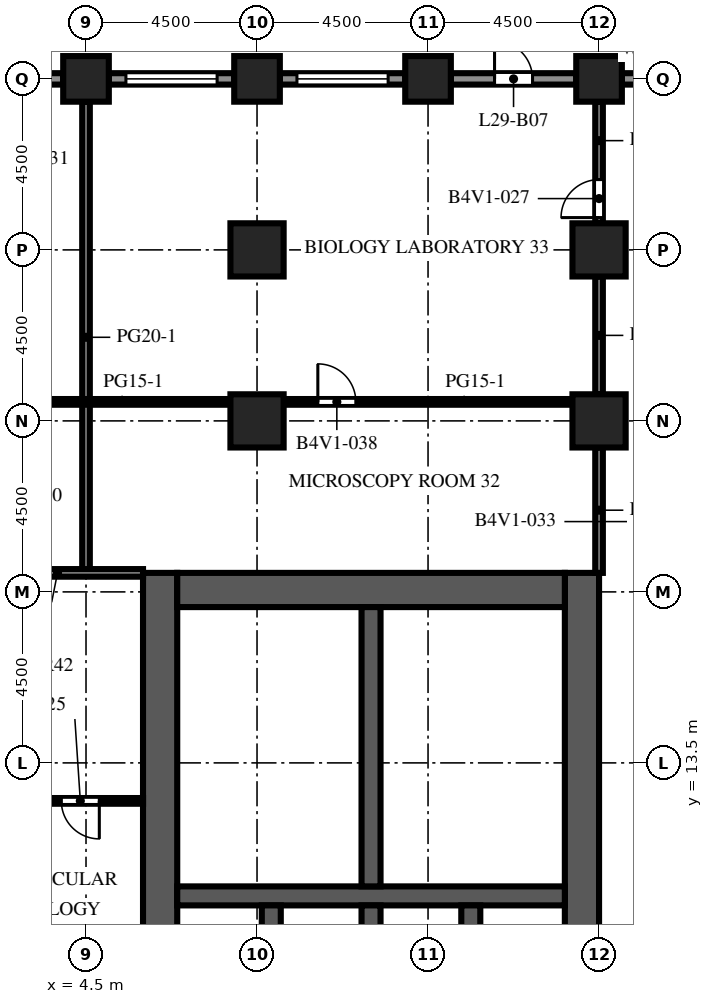
"""IFC4 building model, lengths in metres.
Left out: names, types, materials, properties, quantities, classifications, styles, units other than length and angle.
Written with IfcOpenShell. Run it as: python <this file> out.ifc"""

import sys

from ifc_helpers import new_model, si_unit, direction, frame, frame_2d, origin, origin_2d, place, context, subcontext, project, spatial, rectangle, extrude, element, fill, save


model = new_model("IFC4")
c1 = context("Model", 3, precision=1e-05, world=origin(), true_north=direction((0.0, 1.0)))
c2 = subcontext(c1, "Body", "Model", "MODEL_VIEW")
j1 = project(units=[si_unit("LENGTHUNIT", "METRE"), si_unit("PLANEANGLEUNIT", "RADIAN")], contexts=[c1])
p1 = place(None, origin())
s1 = spatial("IfcSite", under=j1, at=p1, CompositionType="ELEMENT")
p2 = place(p1, origin())
s2 = spatial("IfcBuilding", under=s1, at=p2, CompositionType="ELEMENT")
p3 = place(p2, frame((0.0, 0.0, 129.0)))
s3 = spatial("IfcBuildingStorey", under=s2, at=p3, CompositionType="ELEMENT", Elevation=129.0)
for number, where, z_axis, x_axis in (
    (1, (4.5, 31.5, 0.0), (0.0, 0.0, 1.0), (1.0, 0.0, 0.0)),
    (2, (9.0, 31.5, 0.0), (0.0, 0.0, 1.0), (1.0, 0.0, 0.0)),
    (3, (13.5, 31.5, 0.0), (0.0, 0.0, 1.0), (1.0, 0.0, 0.0)),
    (4, (18.0, 31.5, 0.0), (0.0, 0.0, 1.0), (1.0, 0.0, 0.0)),
):
    element("IfcColumn", number, at=place(p3, frame(where, z_axis=z_axis, x_axis=x_axis)), inside=s3, PredefinedType="COLUMN", context=c2, shape_type="SweptSolid", body=[
        extrude(rectangle(XDim=1.2, YDim=1.2, at=origin_2d()), origin(), (0.0, 0.0, 1.0), 4.1),
    ])
for number, where, z_axis, x_axis in (
    (5, (9.0, 22.5, 0.0), (0.0, 0.0, 1.0), (1.0, 0.0, 0.0)),
    (6, (9.0, 27.0, 0.0), (0.0, 0.0, 1.0), (1.0, 0.0, 0.0)),
    (7, (18.0, 22.5, 0.0), (0.0, 0.0, 1.0), (1.0, 0.0, 0.0)),
    (8, (18.0, 27.0, 0.0), (0.0, 0.0, 1.0), (1.0, 0.0, 0.0)),
):
    element("IfcColumn", number, at=place(p3, frame(where, z_axis=z_axis, x_axis=x_axis)), inside=s3, PredefinedType="COLUMN", context=c2, shape_type="SweptSolid", body=[
        extrude(rectangle(XDim=1.4, YDim=1.4, at=origin_2d()), origin(), (0.0, 0.0, 1.0), 4.1),
    ])
p4 = place(p3, frame((6.45, -9.0, 0.0), z_axis=(0.0, 0.0, 1.0), x_axis=(0.0, 1.0, 0.0)))
e9 = element("IfcWall", 9, at=p4, inside=s3, PredefinedType="SHEAR", context=c2, shape_type="SweptSolid", body=[
    extrude(rectangle(XDim=27.5, YDim=0.9, at=frame_2d((13.75, 0.0))), origin(), (0.0, 0.0, 1.0), 4.1),
])
p5 = place(p4, frame((12.55, 0.0, 0.0)))
e10 = element("IfcOpeningElement", 10, at=p5, cuts=e9, PredefinedType="OPENING", context=c2, shape_type="SweptSolid", body=[
    extrude(rectangle(XDim=2.4, YDim=2.4, at=frame_2d((1.2, 1.2))), frame((0.0, 0.46, 0.0), z_axis=(0.0, -1.0, 0.0), x_axis=(1.0, 0.0, 0.0)), (0.0, 0.0, 1.0), 0.92),
])
p6 = place(p4, frame((3.975, 0.0, 0.0)))
e11 = element("IfcOpeningElement", 11, at=p6, cuts=e9, PredefinedType="OPENING", context=c2, shape_type="SweptSolid", body=[
    extrude(rectangle(XDim=1.2, YDim=2.1, at=frame_2d((0.6, 1.05))), frame((0.0, 0.46, 0.0), z_axis=(0.0, -1.0, 0.0), x_axis=(1.0, 0.0, 0.0)), (0.0, 0.0, 1.0), 0.92),
])
p7 = place(p4, frame((22.325, 0.0, 0.0)))
e12 = element("IfcOpeningElement", 12, at=p7, cuts=e9, PredefinedType="OPENING", context=c2, shape_type="SweptSolid", body=[
    extrude(rectangle(XDim=1.2, YDim=2.1, at=frame_2d((0.6, 1.05))), frame((0.0, 0.46, 0.0), z_axis=(0.0, -1.0, 0.0), x_axis=(1.0, 0.0, 0.0)), (0.0, 0.0, 1.0), 0.92),
])
p8 = place(p3, frame((17.55, -9.0, 0.0), z_axis=(0.0, 0.0, 1.0), x_axis=(0.0, 1.0, 0.0)))
e13 = element("IfcWall", 13, at=p8, inside=s3, PredefinedType="SHEAR", context=c2, shape_type="SweptSolid", body=[
    extrude(rectangle(XDim=27.5, YDim=0.9, at=frame_2d((13.75, 0.0))), origin(), (0.0, 0.0, 1.0), 4.1),
])
p9 = place(p8, frame((12.55, 0.0, 0.0)))
e14 = element("IfcOpeningElement", 14, at=p9, cuts=e13, PredefinedType="OPENING", context=c2, shape_type="SweptSolid", body=[
    extrude(rectangle(XDim=2.4, YDim=2.4, at=frame_2d((1.2, 1.2))), frame((0.0, 0.46, 0.0), z_axis=(0.0, -1.0, 0.0), x_axis=(1.0, 0.0, 0.0)), (0.0, 0.0, 1.0), 0.92),
])
p10 = place(p8, frame((6.825, 0.0, 0.0)))
e15 = element("IfcOpeningElement", 15, at=p10, cuts=e13, PredefinedType="OPENING", context=c2, shape_type="SweptSolid", body=[
    extrude(rectangle(XDim=1.2, YDim=2.1, at=frame_2d((0.6, 1.05))), frame((0.0, 0.46, 0.0), z_axis=(0.0, -1.0, 0.0), x_axis=(1.0, 0.0, 0.0)), (0.0, 0.0, 1.0), 0.92),
])
p11 = place(p8, frame((19.475, 0.0, 0.0)))
e16 = element("IfcOpeningElement", 16, at=p11, cuts=e13, PredefinedType="OPENING", context=c2, shape_type="SweptSolid", body=[
    extrude(rectangle(XDim=1.2, YDim=2.1, at=frame_2d((0.6, 1.05))), frame((0.0, 0.46, 0.0), z_axis=(0.0, -1.0, 0.0), x_axis=(1.0, 0.0, 0.0)), (0.0, 0.0, 1.0), 0.92),
])
p12 = place(p3, frame((6.9, 18.05, 0.0), z_axis=(0.0, 0.0, 1.0), x_axis=(1.0, 0.0, 0.0)))
e17 = element("IfcWall", 17, at=p12, inside=s3, PredefinedType="SHEAR", context=c2, shape_type="SweptSolid", body=[
    extrude(rectangle(XDim=10.2, YDim=0.9, at=frame_2d((5.1, 0.0))), origin(), (0.0, 0.0, 1.0), 4.1),
])
p13 = place(p3, frame((6.9, 10.0, 0.0), z_axis=(0.0, 0.0, 1.0), x_axis=(1.0, 0.0, 0.0)))
e18 = element("IfcWall", 18, at=p13, inside=s3, PredefinedType="SHEAR", context=c2, shape_type="SweptSolid", body=[
    extrude(rectangle(XDim=10.2, YDim=0.5, at=frame_2d((5.1, 0.0))), origin(), (0.0, 0.0, 1.0), 4.1),
])
for number, where, z_axis, x_axis in (
    (19, (9.375, 6.95, 0.0), (0.0, 0.0, 1.0), (0.0, 1.0, 0.0)),
    (20, (12.0, 6.95, 0.0), (0.0, 0.0, 1.0), (0.0, 1.0, 0.0)),
    (21, (14.625, 6.95, 0.0), (0.0, 0.0, 1.0), (0.0, 1.0, 0.0)),
):
    element("IfcWall", number, at=place(p3, frame(where, z_axis=z_axis, x_axis=x_axis)), inside=s3, PredefinedType="SHEAR", context=c2, shape_type="SweptSolid", body=[
        extrude(rectangle(XDim=2.8, YDim=0.5, at=frame_2d((1.4, 0.0))), origin(), (0.0, 0.0, 1.0), 4.1),
    ])
p14 = place(p3, frame((12.0, 10.25, 0.0), z_axis=(0.0, 0.0, 1.0), x_axis=(0.0, 1.0, 0.0)))
e22 = element("IfcWall", 22, at=p14, inside=s3, PredefinedType="SHEAR", context=c2, shape_type="SweptSolid", body=[
    extrude(rectangle(XDim=7.35, YDim=0.5, at=frame_2d((3.675, 0.0))), origin(), (0.0, 0.0, 1.0), 4.1),
])
p15 = place(p3, frame((18.6, 31.5, 0.0), z_axis=(0.0, 0.0, 1.0), x_axis=(1.0, 0.0, 0.0)))
e23 = element("IfcWall", 23, at=p15, inside=s3, PredefinedType="SOLIDWALL", context=c2, shape_type="SweptSolid", body=[
    extrude(rectangle(XDim=3.3, YDim=0.3, at=frame_2d((1.65, 0.0))), origin(), (0.0, 0.0, 1.0), 2.75),
])
p16 = place(p15, frame((0.525, 0.0, 0.8)))
e24 = element("IfcOpeningElement", 24, at=p16, cuts=e23, PredefinedType="OPENING", context=c2, shape_type="SweptSolid", body=[
    extrude(rectangle(XDim=1.2, YDim=1.7, at=frame_2d((0.6, 0.85))), frame((0.0, 0.16, 0.0), z_axis=(0.0, -1.0, 0.0), x_axis=(1.0, 0.0, 0.0)), (0.0, 0.0, 1.0), 0.32),
])
p17 = place(p3, frame((14.1, 31.5, 0.0), z_axis=(0.0, 0.0, 1.0), x_axis=(1.0, 0.0, 0.0)))
e25 = element("IfcWall", 25, at=p17, inside=s3, PredefinedType="SOLIDWALL", context=c2, shape_type="SweptSolid", body=[
    extrude(rectangle(XDim=3.3, YDim=0.3, at=frame_2d((1.65, 0.0))), origin(), (0.0, 0.0, 1.0), 2.75),
])
p18 = place(p17, frame((1.15, 0.0, 0.0)))
e26 = element("IfcOpeningElement", 26, at=p18, cuts=e25, PredefinedType="OPENING", context=c2, shape_type="SweptSolid", body=[
    extrude(rectangle(XDim=1.0, YDim=2.2, at=frame_2d((0.5, 1.1))), frame((0.0, 0.16, 0.0), z_axis=(0.0, -1.0, 0.0), x_axis=(1.0, 0.0, 0.0)), (0.0, 0.0, 1.0), 0.32),
])
p19 = place(p3, frame((9.6, 31.5, 0.0), z_axis=(0.0, 0.0, 1.0), x_axis=(1.0, 0.0, 0.0)))
e27 = element("IfcWall", 27, at=p19, inside=s3, PredefinedType="SOLIDWALL", context=c2, shape_type="SweptSolid", body=[
    extrude(rectangle(XDim=3.3, YDim=0.3, at=frame_2d((1.65, 0.0))), origin(), (0.0, 0.0, 1.0), 2.75),
])
p20 = place(p19, frame((0.45, 0.0, 0.8)))
e28 = element("IfcOpeningElement", 28, at=p20, cuts=e27, PredefinedType="OPENING", context=c2, shape_type="SweptSolid", body=[
    extrude(rectangle(XDim=2.4, YDim=1.7, at=frame_2d((1.2, 0.85))), frame((0.0, 0.16, 0.0), z_axis=(0.0, -1.0, 0.0), x_axis=(1.0, 0.0, 0.0)), (0.0, 0.0, 1.0), 0.32),
])
p21 = place(p3, frame((5.1, 31.5, 0.0), z_axis=(0.0, 0.0, 1.0), x_axis=(1.0, 0.0, 0.0)))
e29 = element("IfcWall", 29, at=p21, inside=s3, PredefinedType="SOLIDWALL", context=c2, shape_type="SweptSolid", body=[
    extrude(rectangle(XDim=3.3, YDim=0.3, at=frame_2d((1.65, 0.0))), origin(), (0.0, 0.0, 1.0), 2.75),
])
p22 = place(p21, frame((0.45, 0.0, 0.8)))
e30 = element("IfcOpeningElement", 30, at=p22, cuts=e29, PredefinedType="OPENING", context=c2, shape_type="SweptSolid", body=[
    extrude(rectangle(XDim=2.4, YDim=1.7, at=frame_2d((1.2, 0.85))), frame((0.0, 0.16, 0.0), z_axis=(0.0, -1.0, 0.0), x_axis=(1.0, 0.0, 0.0)), (0.0, 0.0, 1.0), 0.32),
])
p23 = place(p3, frame((0.6, 31.5, 0.0), z_axis=(0.0, 0.0, 1.0), x_axis=(1.0, 0.0, 0.0)))
e31 = element("IfcWall", 31, at=p23, inside=s3, PredefinedType="SOLIDWALL", context=c2, shape_type="SweptSolid", body=[
    extrude(rectangle(XDim=3.3, YDim=0.3, at=frame_2d((1.65, 0.0))), origin(), (0.0, 0.0, 1.0), 2.75),
])
p24 = place(p23, frame((0.45, 0.0, 0.8)))
e32 = element("IfcOpeningElement", 32, at=p24, cuts=e31, PredefinedType="OPENING", context=c2, shape_type="SweptSolid", body=[
    extrude(rectangle(XDim=2.4, YDim=1.7, at=frame_2d((1.2, 0.85))), frame((0.0, 0.16, 0.0), z_axis=(0.0, -1.0, 0.0), x_axis=(1.0, 0.0, 0.0)), (0.0, 0.0, 1.0), 0.32),
])
p25 = place(p3, frame((8.3, 10.25, 0.0), z_axis=(0.0, 0.0, 1.0), x_axis=(0.0, 1.0, 0.0)))
e33 = element("IfcWall", 33, at=p25, inside=s3, PredefinedType="PARTITIONING", context=c2, shape_type="SweptSolid", body=[
    extrude(rectangle(XDim=2.205, YDim=0.1, at=frame_2d((1.103, 0.0))), origin(), (0.0, 0.0, 1.0), 3.65),
])
p26 = place(p25, frame((0.603, 0.0, 0.0)))
e34 = element("IfcOpeningElement", 34, at=p26, cuts=e33, PredefinedType="OPENING", context=c2, shape_type="SweptSolid", body=[
    extrude(rectangle(XDim=1.0, YDim=2.1, at=frame_2d((0.5, 1.05))), frame((0.0, 0.06, 0.0), z_axis=(0.0, -1.0, 0.0), x_axis=(1.0, 0.0, 0.0)), (0.0, 0.0, 1.0), 0.12),
])
p27 = place(p3, frame((8.3, 12.455, 0.0), z_axis=(0.0, 0.0, 1.0), x_axis=(0.0, 1.0, 0.0)))
e35 = element("IfcWall", 35, at=p27, inside=s3, PredefinedType="PARTITIONING", context=c2, shape_type="SweptSolid", body=[
    extrude(rectangle(XDim=2.352, YDim=0.1, at=frame_2d((1.176, 0.0))), origin(), (0.0, 0.0, 1.0), 3.65),
])
p28 = place(p27, frame((0.676, 0.0, 0.0)))
e36 = element("IfcOpeningElement", 36, at=p28, cuts=e35, PredefinedType="OPENING", context=c2, shape_type="SweptSolid", body=[
    extrude(rectangle(XDim=1.0, YDim=2.1, at=frame_2d((0.5, 1.05))), frame((0.0, 0.06, 0.0), z_axis=(0.0, -1.0, 0.0), x_axis=(1.0, 0.0, 0.0)), (0.0, 0.0, 1.0), 0.12),
])
p29 = place(p3, frame((8.3, 14.807, 0.0), z_axis=(0.0, 0.0, 1.0), x_axis=(0.0, 1.0, 0.0)))
e37 = element("IfcWall", 37, at=p29, inside=s3, PredefinedType="PARTITIONING", context=c2, shape_type="SweptSolid", body=[
    extrude(rectangle(XDim=2.793, YDim=0.1, at=frame_2d((1.396, 0.0))), origin(), (0.0, 0.0, 1.0), 3.65),
])
p30 = place(p29, frame((0.896, 0.0, 0.0)))
e38 = element("IfcOpeningElement", 38, at=p30, cuts=e37, PredefinedType="OPENING", context=c2, shape_type="SweptSolid", body=[
    extrude(rectangle(XDim=1.0, YDim=2.1, at=frame_2d((0.5, 1.05))), frame((0.0, 0.06, 0.0), z_axis=(0.0, -1.0, 0.0), x_axis=(1.0, 0.0, 0.0)), (0.0, 0.0, 1.0), 0.12),
])
for number, where, z_axis, x_axis in (
    (39, (8.3, 12.455, 0.0), (0.0, 0.0, 1.0), (1.0, 0.0, 0.0)),
    (40, (8.3, 14.807, 0.0), (0.0, 0.0, 1.0), (1.0, 0.0, 0.0)),
):
    element("IfcWall", number, at=place(p3, frame(where, z_axis=z_axis, x_axis=x_axis)), inside=s3, PredefinedType="PARTITIONING", context=c2, shape_type="SweptSolid", body=[
        extrude(rectangle(XDim=3.45, YDim=0.1, at=frame_2d((1.725, 0.0))), origin(), (0.0, 0.0, 1.0), 3.65),
    ])
p31 = place(p3, frame((4.5, 18.5, 0.0), z_axis=(0.0, 0.0, 1.0), x_axis=(0.0, 1.0, 0.0)))
e41 = element("IfcWall", 41, at=p31, inside=s3, PredefinedType="PARTITIONING", context=c2, shape_type="SweptSolid", body=[
    extrude(rectangle(XDim=12.4, YDim=0.2, at=frame_2d((6.2, 0.0))), origin(), (0.0, 0.0, 1.0), 3.65),
])
p32 = place(p3, frame((18.0, 18.5, 0.0), z_axis=(0.0, 0.0, 1.0), x_axis=(0.0, 1.0, 0.0)))
e42 = element("IfcWall", 42, at=p32, inside=s3, PredefinedType="PARTITIONING", context=c2, shape_type="SweptSolid", body=[
    extrude(rectangle(XDim=3.3, YDim=0.2, at=frame_2d((1.65, 0.0))), origin(), (0.0, 0.0, 1.0), 3.65),
])
p33 = place(p3, frame((18.0, 23.2, 0.0), z_axis=(0.0, 0.0, 1.0), x_axis=(0.0, 1.0, 0.0)))
e43 = element("IfcWall", 43, at=p33, inside=s3, PredefinedType="PARTITIONING", context=c2, shape_type="SweptSolid", body=[
    extrude(rectangle(XDim=3.1, YDim=0.2, at=frame_2d((1.55, 0.0))), origin(), (0.0, 0.0, 1.0), 3.65),
])
p34 = place(p3, frame((18.0, 27.7, 0.0), z_axis=(0.0, 0.0, 1.0), x_axis=(0.0, 1.0, 0.0)))
e44 = element("IfcWall", 44, at=p34, inside=s3, PredefinedType="PARTITIONING", context=c2, shape_type="SweptSolid", body=[
    extrude(rectangle(XDim=3.2, YDim=0.2, at=frame_2d((1.6, 0.0))), origin(), (0.0, 0.0, 1.0), 3.65),
])
p35 = place(p34, frame((0.15, 0.0, 0.0)))
e45 = element("IfcOpeningElement", 45, at=p35, cuts=e44, PredefinedType="OPENING", context=c2, shape_type="SweptSolid", body=[
    extrude(rectangle(XDim=1.0, YDim=2.1, at=frame_2d((0.5, 1.05))), frame((0.0, 0.11, 0.0), z_axis=(0.0, -1.0, 0.0), x_axis=(1.0, 0.0, 0.0)), (0.0, 0.0, 1.0), 0.22),
])
p36 = place(p3, frame((1.5, 12.5, 0.0), z_axis=(0.0, 0.0, 1.0), x_axis=(1.0, 0.0, 0.0)))
e46 = element("IfcWall", 46, at=p36, inside=s3, PredefinedType="PARTITIONING", context=c2, shape_type="SweptSolid", body=[
    extrude(rectangle(XDim=4.5, YDim=0.15, at=frame_2d((2.25, 0.0))), origin(), (0.0, 0.0, 1.0), 3.65),
])
p37 = place(p36, frame((2.35, 0.0, 0.0)))
e47 = element("IfcOpeningElement", 47, at=p37, cuts=e46, PredefinedType="OPENING", context=c2, shape_type="SweptSolid", body=[
    extrude(rectangle(XDim=1.0, YDim=2.1, at=frame_2d((0.5, 1.05))), frame((0.0, 0.085, 0.0), z_axis=(0.0, -1.0, 0.0), x_axis=(1.0, 0.0, 0.0)), (0.0, 0.0, 1.0), 0.17),
])
p38 = place(p3, frame((1.5, 18.5, 0.0), z_axis=(0.0, 0.0, 1.0), x_axis=(1.0, 0.0, 0.0)))
e48 = element("IfcWall", 48, at=p38, inside=s3, PredefinedType="PARTITIONING", context=c2, shape_type="SweptSolid", body=[
    extrude(rectangle(XDim=4.5, YDim=0.2, at=frame_2d((2.25, 0.0))), origin(), (0.0, 0.0, 1.0), 3.65),
])
p39 = place(p3, frame((8.3, 23.0, 0.0), z_axis=(0.0, 0.0, 1.0), x_axis=(-1.0, 0.0, 0.0)))
e49 = element("IfcWall", 49, at=p39, inside=s3, PredefinedType="PARTITIONING", context=c2, shape_type="SweptSolid", body=[
    extrude(rectangle(XDim=7.6, YDim=0.15, at=frame_2d((3.8, 0.0))), origin(), (0.0, 0.0, 1.0), 3.65),
])
p40 = place(p39, frame((5.7, 0.0, 0.0)))
e50 = element("IfcOpeningElement", 50, at=p40, cuts=e49, PredefinedType="OPENING", context=c2, shape_type="SweptSolid", body=[
    extrude(rectangle(XDim=1.0, YDim=2.1, at=frame_2d((0.5, 1.05))), frame((0.0, 0.085, 0.0), z_axis=(0.0, -1.0, 0.0), x_axis=(1.0, 0.0, 0.0)), (0.0, 0.0, 1.0), 0.17),
])
p41 = place(p3, frame((17.3, 23.0, 0.0), z_axis=(0.0, 0.0, 1.0), x_axis=(-1.0, 0.0, 0.0)))
e51 = element("IfcWall", 51, at=p41, inside=s3, PredefinedType="PARTITIONING", context=c2, shape_type="SweptSolid", body=[
    extrude(rectangle(XDim=7.6, YDim=0.15, at=frame_2d((3.8, 0.0))), origin(), (0.0, 0.0, 1.0), 3.65),
])
p42 = place(p41, frame((5.7, 0.0, 0.0)))
e52 = element("IfcOpeningElement", 52, at=p42, cuts=e51, PredefinedType="OPENING", context=c2, shape_type="SweptSolid", body=[
    extrude(rectangle(XDim=1.0, YDim=2.1, at=frame_2d((0.5, 1.05))), frame((0.0, 0.085, 0.0), z_axis=(0.0, -1.0, 0.0), x_axis=(1.0, 0.0, 0.0)), (0.0, 0.0, 1.0), 0.17),
])
p43 = place(p18, origin())
e53 = element("IfcDoor", 53, at=p43, inside=s3, OperationType="SINGLE_SWING_LEFT", PredefinedType="DOOR", context=c2, shape_type="SweptSolid", body=[
    extrude(rectangle(XDim=1.0, YDim=2.2, at=frame_2d((0.5, 1.1))), frame((0.0, 0.025, 0.0), z_axis=(0.0, -1.0, 0.0), x_axis=(1.0, 0.0, 0.0)), (0.0, 0.0, 1.0), 0.05),
])
fill(e26, e53)
p44 = place(p20, origin())
e54 = element("IfcWindow", 54, at=p44, inside=s3, PartitioningType="SINGLE_PANEL", PredefinedType="WINDOW", context=c2, shape_type="SweptSolid", body=[
    extrude(rectangle(XDim=2.4, YDim=1.7, at=frame_2d((1.2, 0.85))), frame((0.0, 0.03, 0.0), z_axis=(0.0, -1.0, 0.0), x_axis=(1.0, 0.0, 0.0)), (0.0, 0.0, 1.0), 0.06),
])
fill(e28, e54)
p45 = place(p22, origin())
e55 = element("IfcWindow", 55, at=p45, inside=s3, PartitioningType="SINGLE_PANEL", PredefinedType="WINDOW", context=c2, shape_type="SweptSolid", body=[
    extrude(rectangle(XDim=2.4, YDim=1.7, at=frame_2d((1.2, 0.85))), frame((0.0, 0.03, 0.0), z_axis=(0.0, -1.0, 0.0), x_axis=(1.0, 0.0, 0.0)), (0.0, 0.0, 1.0), 0.06),
])
fill(e30, e55)
p46 = place(p11, frame((1.2, 0.0, 0.0), z_axis=(0.0, 0.0, 1.0), x_axis=(-1.0, 0.0, 0.0)))
e56 = element("IfcDoor", 56, at=p46, inside=s3, OperationType="SINGLE_SWING_LEFT", PredefinedType="DOOR", context=c2, shape_type="SweptSolid", body=[
    extrude(rectangle(XDim=1.2, YDim=2.1, at=frame_2d((0.6, 1.05))), frame((0.0, 0.025, 0.0), z_axis=(0.0, -1.0, 0.0), x_axis=(1.0, 0.0, 0.0)), (0.0, 0.0, 1.0), 0.05),
])
fill(e16, e56)
p47 = place(p7, origin())
e57 = element("IfcDoor", 57, at=p47, inside=s3, OperationType="SINGLE_SWING_RIGHT", PredefinedType="DOOR", context=c2, shape_type="SweptSolid", body=[
    extrude(rectangle(XDim=1.2, YDim=2.1, at=frame_2d((0.6, 1.05))), frame((0.0, -0.375, 0.0), z_axis=(0.0, -1.0, 0.0), x_axis=(1.0, 0.0, 0.0)), (0.0, 0.0, 1.0), 0.05),
])
fill(e12, e57)
p48 = place(p26, origin())
e58 = element("IfcDoor", 58, at=p48, inside=s3, OperationType="SINGLE_SWING_LEFT", PredefinedType="DOOR", context=c2, shape_type="SweptSolid", body=[
    extrude(rectangle(XDim=1.0, YDim=2.1, at=frame_2d((0.5, 1.05))), frame((0.0, 0.025, 0.0), z_axis=(0.0, -1.0, 0.0), x_axis=(1.0, 0.0, 0.0)), (0.0, 0.0, 1.0), 0.05),
])
fill(e34, e58)
p49 = place(p28, origin())
e59 = element("IfcDoor", 59, at=p49, inside=s3, OperationType="SINGLE_SWING_RIGHT", PredefinedType="DOOR", context=c2, shape_type="SweptSolid", body=[
    extrude(rectangle(XDim=1.0, YDim=2.1, at=frame_2d((0.5, 1.05))), frame((0.0, 0.025, 0.0), z_axis=(0.0, -1.0, 0.0), x_axis=(1.0, 0.0, 0.0)), (0.0, 0.0, 1.0), 0.05),
])
fill(e36, e59)
p50 = place(p30, origin())
e60 = element("IfcDoor", 60, at=p50, inside=s3, OperationType="SINGLE_SWING_LEFT", PredefinedType="DOOR", context=c2, shape_type="SweptSolid", body=[
    extrude(rectangle(XDim=1.0, YDim=2.1, at=frame_2d((0.5, 1.05))), frame((0.0, 0.025, 0.0), z_axis=(0.0, -1.0, 0.0), x_axis=(1.0, 0.0, 0.0)), (0.0, 0.0, 1.0), 0.05),
])
fill(e38, e60)
p51 = place(p37, origin())
e61 = element("IfcDoor", 61, at=p51, inside=s3, OperationType="SINGLE_SWING_RIGHT", PredefinedType="DOOR", context=c2, shape_type="SweptSolid", body=[
    extrude(rectangle(XDim=1.0, YDim=2.1, at=frame_2d((0.5, 1.05))), frame((0.0, 0.025, 0.0), z_axis=(0.0, -1.0, 0.0), x_axis=(1.0, 0.0, 0.0)), (0.0, 0.0, 1.0), 0.05),
])
fill(e47, e61)
p52 = place(p35, origin())
e62 = element("IfcDoor", 62, at=p52, inside=s3, OperationType="SINGLE_SWING_LEFT", PredefinedType="DOOR", context=c2, shape_type="SweptSolid", body=[
    extrude(rectangle(XDim=1.0, YDim=2.1, at=frame_2d((0.5, 1.05))), frame((0.0, 0.025, 0.0), z_axis=(0.0, -1.0, 0.0), x_axis=(1.0, 0.0, 0.0)), (0.0, 0.0, 1.0), 0.05),
])
fill(e45, e62)
p53 = place(p42, origin())
e63 = element("IfcDoor", 63, at=p53, inside=s3, OperationType="SINGLE_SWING_RIGHT", PredefinedType="DOOR", context=c2, shape_type="SweptSolid", body=[
    extrude(rectangle(XDim=1.0, YDim=2.1, at=frame_2d((0.5, 1.05))), frame((0.0, 0.025, 0.0), z_axis=(0.0, -1.0, 0.0), x_axis=(1.0, 0.0, 0.0)), (0.0, 0.0, 1.0), 0.05),
])
fill(e52, e63)
save(model, sys.argv[1])
